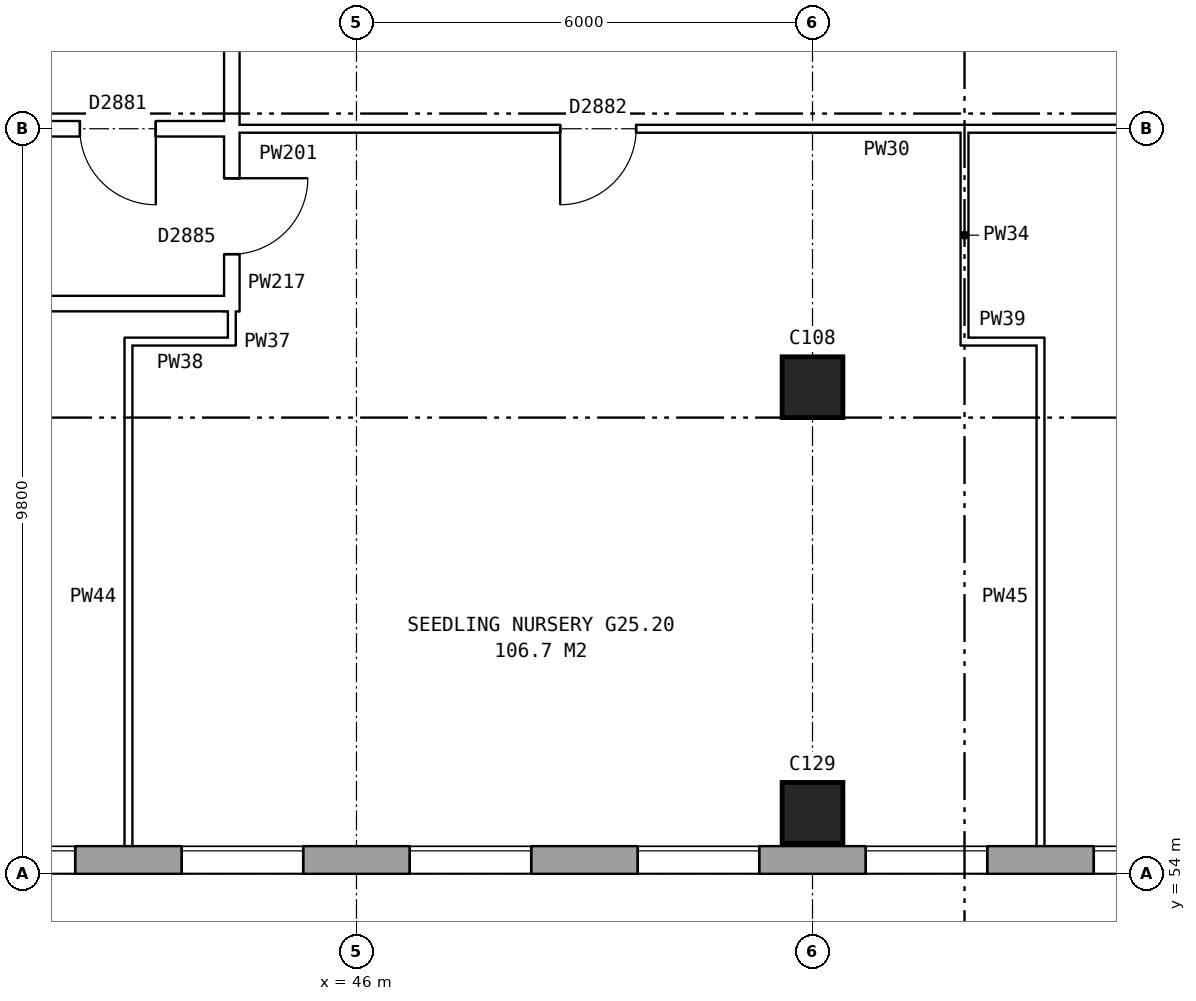
"""IFC4 building model, lengths in metres.
Left out: names, types, materials, properties, quantities, classifications, styles, units other than length and angle.
Written with IfcOpenShell. Run it as: python <this file> out.ifc"""

import sys

from ifc_helpers import new_model, si_unit, direction, frame, frame_2d, origin, origin_2d, place, context, subcontext, project, spatial, rectangle, extrude, element, fill, save


model = new_model("IFC4")
c1 = context("Model", 3, precision=1e-05, world=origin(), true_north=direction((0.0, 1.0)))
c2 = subcontext(c1, "Body", "Model", "MODEL_VIEW")
j1 = project(units=[si_unit("LENGTHUNIT", "METRE"), si_unit("PLANEANGLEUNIT", "RADIAN")], contexts=[c1])
p1 = place(None, origin())
s1 = spatial("IfcSite", under=j1, at=p1, CompositionType="ELEMENT")
p2 = place(p1, origin())
s2 = spatial("IfcBuilding", under=s1, at=p2, CompositionType="ELEMENT")
p3 = place(p2, frame((0.0, 0.0, 90.2)))
s3 = spatial("IfcBuildingStorey", under=s2, at=p3, CompositionType="ELEMENT", Elevation=90.2)
for number, where, z_axis, x_axis in (
    (1, (52.0, 54.8, 0.0), (0.0, 0.0, 1.0), (1.0, 0.0, 0.0)),
    (2, (52.0, 60.4, 0.0), (0.0, 0.0, 1.0), (1.0, 0.0, 0.0)),
):
    element("IfcColumn", number, at=place(p3, frame(where, z_axis=z_axis, x_axis=x_axis)), inside=s3, PredefinedType="COLUMN", context=c2, shape_type="SweptSolid", body=[
        extrude(rectangle(XDim=0.8, YDim=0.8, at=origin_2d()), origin(), (0.0, 0.0, 1.0), 5.6),
    ])
p4 = place(p3, frame((28.075, 54.18, 0.0), z_axis=(0.0, 0.0, 1.0), x_axis=(1.0, 0.0, 0.0)))
e3 = element("IfcWall", 3, at=p4, inside=s3, PredefinedType="STANDARD", context=c2, shape_type="SweptSolid", body=[
    extrude(rectangle(XDim=44.851, YDim=0.36, at=frame_2d((22.425, 0.0))), origin(), (0.0, 0.0, 1.0), 5.6),
])
p5 = place(p4, frame((0.625, 0.0, 0.15)))
e4 = element("IfcOpeningElement", 4, at=p5, cuts=e3, PredefinedType="OPENING", context=c2, shape_type="SweptSolid", body=[
    extrude(rectangle(XDim=1.6, YDim=2.4, at=frame_2d((0.8, 1.2))), frame((0.0, 0.19, 0.0), z_axis=(0.0, -1.0, 0.0), x_axis=(1.0, 0.0, 0.0)), (0.0, 0.0, 1.0), 0.38),
])
p6 = place(p4, frame((3.625, 0.0, 0.15)))
e5 = element("IfcOpeningElement", 5, at=p6, cuts=e3, PredefinedType="OPENING", context=c2, shape_type="SweptSolid", body=[
    extrude(rectangle(XDim=1.6, YDim=2.4, at=frame_2d((0.8, 1.2))), frame((0.0, 0.19, 0.0), z_axis=(0.0, -1.0, 0.0), x_axis=(1.0, 0.0, 0.0)), (0.0, 0.0, 1.0), 0.38),
])
p7 = place(p4, frame((6.625, 0.0, 0.15)))
e6 = element("IfcOpeningElement", 6, at=p7, cuts=e3, PredefinedType="OPENING", context=c2, shape_type="SweptSolid", body=[
    extrude(rectangle(XDim=1.6, YDim=2.4, at=frame_2d((0.8, 1.2))), frame((0.0, 0.19, 0.0), z_axis=(0.0, -1.0, 0.0), x_axis=(1.0, 0.0, 0.0)), (0.0, 0.0, 1.0), 0.38),
])
p8 = place(p4, frame((9.625, 0.0, 0.15)))
e7 = element("IfcOpeningElement", 7, at=p8, cuts=e3, PredefinedType="OPENING", context=c2, shape_type="SweptSolid", body=[
    extrude(rectangle(XDim=1.6, YDim=2.4, at=frame_2d((0.8, 1.2))), frame((0.0, 0.19, 0.0), z_axis=(0.0, -1.0, 0.0), x_axis=(1.0, 0.0, 0.0)), (0.0, 0.0, 1.0), 0.38),
])
p9 = place(p4, frame((12.625, 0.0, 0.15)))
e8 = element("IfcOpeningElement", 8, at=p9, cuts=e3, PredefinedType="OPENING", context=c2, shape_type="SweptSolid", body=[
    extrude(rectangle(XDim=1.6, YDim=2.4, at=frame_2d((0.8, 1.2))), frame((0.0, 0.19, 0.0), z_axis=(0.0, -1.0, 0.0), x_axis=(1.0, 0.0, 0.0)), (0.0, 0.0, 1.0), 0.38),
])
p10 = place(p4, frame((15.625, 0.0, 0.15)))
e9 = element("IfcOpeningElement", 9, at=p10, cuts=e3, PredefinedType="OPENING", context=c2, shape_type="SweptSolid", body=[
    extrude(rectangle(XDim=1.6, YDim=2.4, at=frame_2d((0.8, 1.2))), frame((0.0, 0.19, 0.0), z_axis=(0.0, -1.0, 0.0), x_axis=(1.0, 0.0, 0.0)), (0.0, 0.0, 1.0), 0.38),
])
p11 = place(p4, frame((18.625, 0.0, 0.15)))
e10 = element("IfcOpeningElement", 10, at=p11, cuts=e3, PredefinedType="OPENING", context=c2, shape_type="SweptSolid", body=[
    extrude(rectangle(XDim=1.6, YDim=2.4, at=frame_2d((0.8, 1.2))), frame((0.0, 0.19, 0.0), z_axis=(0.0, -1.0, 0.0), x_axis=(1.0, 0.0, 0.0)), (0.0, 0.0, 1.0), 0.38),
])
p12 = place(p4, frame((21.625, 0.0, 0.15)))
e11 = element("IfcOpeningElement", 11, at=p12, cuts=e3, PredefinedType="OPENING", context=c2, shape_type="SweptSolid", body=[
    extrude(rectangle(XDim=1.6, YDim=2.4, at=frame_2d((0.8, 1.2))), frame((0.0, 0.19, 0.0), z_axis=(0.0, -1.0, 0.0), x_axis=(1.0, 0.0, 0.0)), (0.0, 0.0, 1.0), 0.38),
])
p13 = place(p4, frame((24.625, 0.0, 0.15)))
e12 = element("IfcOpeningElement", 12, at=p13, cuts=e3, PredefinedType="OPENING", context=c2, shape_type="SweptSolid", body=[
    extrude(rectangle(XDim=1.6, YDim=2.4, at=frame_2d((0.8, 1.2))), frame((0.0, 0.19, 0.0), z_axis=(0.0, -1.0, 0.0), x_axis=(1.0, 0.0, 0.0)), (0.0, 0.0, 1.0), 0.38),
])
p14 = place(p4, frame((27.625, 0.0, 0.15)))
e13 = element("IfcOpeningElement", 13, at=p14, cuts=e3, PredefinedType="OPENING", context=c2, shape_type="SweptSolid", body=[
    extrude(rectangle(XDim=1.6, YDim=2.4, at=frame_2d((0.8, 1.2))), frame((0.0, 0.19, 0.0), z_axis=(0.0, -1.0, 0.0), x_axis=(1.0, 0.0, 0.0)), (0.0, 0.0, 1.0), 0.38),
])
p15 = place(p4, frame((30.625, 0.0, 0.15)))
e14 = element("IfcOpeningElement", 14, at=p15, cuts=e3, PredefinedType="OPENING", context=c2, shape_type="SweptSolid", body=[
    extrude(rectangle(XDim=1.6, YDim=2.4, at=frame_2d((0.8, 1.2))), frame((0.0, 0.19, 0.0), z_axis=(0.0, -1.0, 0.0), x_axis=(1.0, 0.0, 0.0)), (0.0, 0.0, 1.0), 0.38),
])
p16 = place(p4, frame((33.625, 0.0, 0.15)))
e15 = element("IfcOpeningElement", 15, at=p16, cuts=e3, PredefinedType="OPENING", context=c2, shape_type="SweptSolid", body=[
    extrude(rectangle(XDim=1.6, YDim=2.4, at=frame_2d((0.8, 1.2))), frame((0.0, 0.19, 0.0), z_axis=(0.0, -1.0, 0.0), x_axis=(1.0, 0.0, 0.0)), (0.0, 0.0, 1.0), 0.38),
])
p17 = place(p4, frame((36.625, 0.0, 0.15)))
e16 = element("IfcOpeningElement", 16, at=p17, cuts=e3, PredefinedType="OPENING", context=c2, shape_type="SweptSolid", body=[
    extrude(rectangle(XDim=1.6, YDim=2.4, at=frame_2d((0.8, 1.2))), frame((0.0, 0.19, 0.0), z_axis=(0.0, -1.0, 0.0), x_axis=(1.0, 0.0, 0.0)), (0.0, 0.0, 1.0), 0.38),
])
p18 = place(p4, frame((39.625, 0.0, 0.15)))
e17 = element("IfcOpeningElement", 17, at=p18, cuts=e3, PredefinedType="OPENING", context=c2, shape_type="SweptSolid", body=[
    extrude(rectangle(XDim=1.6, YDim=2.4, at=frame_2d((0.8, 1.2))), frame((0.0, 0.19, 0.0), z_axis=(0.0, -1.0, 0.0), x_axis=(1.0, 0.0, 0.0)), (0.0, 0.0, 1.0), 0.38),
])
p19 = place(p4, frame((42.625, 0.0, 0.15)))
e18 = element("IfcOpeningElement", 18, at=p19, cuts=e3, PredefinedType="OPENING", context=c2, shape_type="SweptSolid", body=[
    extrude(rectangle(XDim=1.6, YDim=2.4, at=frame_2d((0.8, 1.2))), frame((0.0, 0.19, 0.0), z_axis=(0.0, -1.0, 0.0), x_axis=(1.0, 0.0, 0.0)), (0.0, 0.0, 1.0), 0.38),
])
p20 = place(p3, frame((44.36, 63.9, 0.0), z_axis=(0.0, 0.0, 1.0), x_axis=(0.0, 1.0, 0.0)))
e19 = element("IfcWall", 19, at=p20, inside=s3, PredefinedType="PARTITIONING", context=c2, shape_type="SweptSolid", body=[
    extrude(rectangle(XDim=12.2, YDim=0.2, at=frame_2d((6.1, 0.0))), origin(), (0.0, 0.0, 1.0), 5.6),
])
p21 = place(p20, frame((5.1, 0.0, 0.0)))
e20 = element("IfcOpeningElement", 20, at=p21, cuts=e19, PredefinedType="OPENING", context=c2, shape_type="SweptSolid", body=[
    extrude(rectangle(XDim=2.0, YDim=2.1, at=frame_2d((1.0, 1.05))), frame((0.0, 0.11, 0.0), z_axis=(0.0, -1.0, 0.0), x_axis=(1.0, 0.0, 0.0)), (0.0, 0.0, 1.0), 0.22),
])
p22 = place(p3, frame((42.95, 61.0, 0.0), z_axis=(0.0, 0.0, 1.0), x_axis=(1.0, 0.0, 0.0)))
e21 = element("IfcWall", 21, at=p22, inside=s3, PredefinedType="PARTITIONING", context=c2, shape_type="SweptSolid", body=[
    extrude(rectangle(XDim=1.46, YDim=0.1, at=frame_2d((0.73, 0.0))), origin(), (0.0, 0.0, 1.0), 5.6),
])
p23 = place(p3, frame((53.95, 61.0, 0.0), z_axis=(0.0, 0.0, 1.0), x_axis=(1.0, 0.0, 0.0)))
e22 = element("IfcWall", 22, at=p23, inside=s3, PredefinedType="PARTITIONING", context=c2, shape_type="SweptSolid", body=[
    extrude(rectangle(XDim=1.1, YDim=0.1, at=frame_2d((0.55, 0.0))), origin(), (0.0, 0.0, 1.0), 5.6),
])
p24 = place(p3, frame((25.24, 61.5, 0.0), z_axis=(0.0, 0.0, 1.0), x_axis=(1.0, 0.0, 0.0)))
e23 = element("IfcWall", 23, at=p24, inside=s3, PredefinedType="PARTITIONING", context=c2, shape_type="SweptSolid", body=[
    extrude(rectangle(XDim=19.22, YDim=0.2, at=frame_2d((9.61, 0.0))), origin(), (0.0, 0.0, 1.0), 5.6),
])
p25 = place(p24, frame((0.94, 0.0, 0.0)))
e24 = element("IfcOpeningElement", 24, at=p25, cuts=e23, PredefinedType="OPENING", context=c2, shape_type="SweptSolid", body=[
    extrude(rectangle(XDim=1.0, YDim=2.1, at=frame_2d((0.5, 1.05))), frame((0.0, 0.11, 0.0), z_axis=(0.0, -1.0, 0.0), x_axis=(1.0, 0.0, 0.0)), (0.0, 0.0, 1.0), 0.22),
])
p26 = place(p24, frame((6.76, 0.0, 0.0)))
e25 = element("IfcOpeningElement", 25, at=p26, cuts=e23, PredefinedType="OPENING", context=c2, shape_type="SweptSolid", body=[
    extrude(rectangle(XDim=1.0, YDim=2.1, at=frame_2d((0.5, 1.05))), frame((0.0, 0.11, 0.0), z_axis=(0.0, -1.0, 0.0), x_axis=(1.0, 0.0, 0.0)), (0.0, 0.0, 1.0), 0.22),
])
p27 = place(p24, frame((15.24, 0.0, 0.0)))
e26 = element("IfcOpeningElement", 26, at=p27, cuts=e23, PredefinedType="OPENING", context=c2, shape_type="SweptSolid", body=[
    extrude(rectangle(XDim=1.0, YDim=2.1, at=frame_2d((0.5, 1.05))), frame((0.0, 0.11, 0.0), z_axis=(0.0, -1.0, 0.0), x_axis=(1.0, 0.0, 0.0)), (0.0, 0.0, 1.0), 0.22),
])
p28 = place(p3, frame((41.36, 63.8, 0.0), z_axis=(0.0, 0.0, 1.0), x_axis=(1.0, 0.0, 0.0)))
e27 = element("IfcWall", 27, at=p28, inside=s3, PredefinedType="PARTITIONING", context=c2, shape_type="SweptSolid", body=[
    extrude(rectangle(XDim=3.1, YDim=0.2, at=frame_2d((1.55, 0.0))), origin(), (0.0, 0.0, 1.0), 5.6),
])
p29 = place(p28, frame((1.0, 0.0, 0.0)))
e28 = element("IfcOpeningElement", 28, at=p29, cuts=e27, PredefinedType="OPENING", context=c2, shape_type="SweptSolid", body=[
    extrude(rectangle(XDim=1.0, YDim=2.1, at=frame_2d((0.5, 1.05))), frame((0.0, 0.11, 0.0), z_axis=(0.0, -1.0, 0.0), x_axis=(1.0, 0.0, 0.0)), (0.0, 0.0, 1.0), 0.22),
])
p30 = place(p3, frame((44.26, 63.8, 0.0), z_axis=(0.0, 0.0, 1.0), x_axis=(1.0, 0.0, 0.0)))
e29 = element("IfcWall", 29, at=p30, inside=s3, PredefinedType="PARTITIONING", context=c2, shape_type="SweptSolid", body=[
    extrude(rectangle(XDim=19.38, YDim=0.1, at=frame_2d((9.69, 0.0))), origin(), (0.0, 0.0, 1.0), 5.6),
])
p31 = place(p30, frame((4.42, 0.0, 0.0)))
e30 = element("IfcOpeningElement", 30, at=p31, cuts=e29, PredefinedType="OPENING", context=c2, shape_type="SweptSolid", body=[
    extrude(rectangle(XDim=1.0, YDim=2.1, at=frame_2d((0.5, 1.05))), frame((0.0, 0.06, 0.0), z_axis=(0.0, -1.0, 0.0), x_axis=(1.0, 0.0, 0.0)), (0.0, 0.0, 1.0), 0.12),
])
p32 = place(p30, frame((14.06, 0.0, 0.0)))
e31 = element("IfcOpeningElement", 31, at=p32, cuts=e29, PredefinedType="OPENING", context=c2, shape_type="SweptSolid", body=[
    extrude(rectangle(XDim=1.0, YDim=2.1, at=frame_2d((0.5, 1.05))), frame((0.0, 0.06, 0.0), z_axis=(0.0, -1.0, 0.0), x_axis=(1.0, 0.0, 0.0)), (0.0, 0.0, 1.0), 0.12),
])
p33 = place(p3, frame((43.0, 54.24, 0.0), z_axis=(0.0, 0.0, 1.0), x_axis=(0.0, 1.0, 0.0)))
e32 = element("IfcWall", 32, at=p33, inside=s3, PredefinedType="PARTITIONING", context=c2, shape_type="SweptSolid", body=[
    extrude(rectangle(XDim=6.81, YDim=0.1, at=frame_2d((3.405, 0.0))), origin(), (0.0, 0.0, 1.0), 5.6),
])
p34 = place(p3, frame((44.36, 61.398, 0.0), z_axis=(0.0, 0.0, 1.0), x_axis=(0.0, 1.0, 0.0)))
e33 = element("IfcWall", 33, at=p34, inside=s3, PredefinedType="PARTITIONING", context=c2, shape_type="SweptSolid", body=[
    extrude(rectangle(XDim=2.502, YDim=0.2, at=frame_2d((1.251, 0.0))), origin(), (0.0, 0.0, 1.0), 5.6),
])
p35 = place(p34, frame((0.751, 0.0, 0.0)))
e34 = element("IfcOpeningElement", 34, at=p35, cuts=e33, PredefinedType="OPENING", context=c2, shape_type="SweptSolid", body=[
    extrude(rectangle(XDim=1.0, YDim=2.1, at=frame_2d((0.5, 1.05))), frame((0.0, 0.11, 0.0), z_axis=(0.0, -1.0, 0.0), x_axis=(1.0, 0.0, 0.0)), (0.0, 0.0, 1.0), 0.22),
])
p36 = place(p3, frame((44.36, 60.95, 0.0), z_axis=(0.0, 0.0, 1.0), x_axis=(0.0, 1.0, 0.0)))
e35 = element("IfcWall", 35, at=p36, inside=s3, PredefinedType="PARTITIONING", context=c2, shape_type="SweptSolid", body=[
    extrude(rectangle(XDim=0.652, YDim=0.1, at=frame_2d((0.326, 0.0))), origin(), (0.0, 0.0, 1.0), 5.6),
])
p37 = place(p3, frame((54.0, 60.95, 0.0), z_axis=(0.0, 0.0, 1.0), x_axis=(0.0, 1.0, 0.0)))
e36 = element("IfcWall", 36, at=p37, inside=s3, PredefinedType="PARTITIONING", context=c2, shape_type="SweptSolid", body=[
    extrude(rectangle(XDim=2.9, YDim=0.1, at=frame_2d((1.45, 0.0))), origin(), (0.0, 0.0, 1.0), 5.6),
])
p38 = place(p3, frame((55.0, 54.24, 0.0), z_axis=(0.0, 0.0, 1.0), x_axis=(0.0, 1.0, 0.0)))
e37 = element("IfcWall", 37, at=p38, inside=s3, PredefinedType="PARTITIONING", context=c2, shape_type="SweptSolid", body=[
    extrude(rectangle(XDim=6.81, YDim=0.1, at=frame_2d((3.405, 0.0))), origin(), (0.0, 0.0, 1.0), 5.6),
])
p39 = place(p9, origin())
e38 = element("IfcWindow", 38, at=p39, inside=s3, PartitioningType="SINGLE_PANEL", PredefinedType="WINDOW", context=c2, shape_type="SweptSolid", body=[
    extrude(rectangle(XDim=1.6, YDim=2.4, at=frame_2d((0.8, 1.2))), frame((0.0, 0.15, 0.0), z_axis=(0.0, -1.0, 0.0), x_axis=(1.0, 0.0, 0.0)), (0.0, 0.0, 1.0), 0.06),
])
fill(e8, e38)
p40 = place(p10, origin())
e39 = element("IfcWindow", 39, at=p40, inside=s3, PartitioningType="SINGLE_PANEL", PredefinedType="WINDOW", context=c2, shape_type="SweptSolid", body=[
    extrude(rectangle(XDim=1.6, YDim=2.4, at=frame_2d((0.8, 1.2))), frame((0.0, 0.15, 0.0), z_axis=(0.0, -1.0, 0.0), x_axis=(1.0, 0.0, 0.0)), (0.0, 0.0, 1.0), 0.06),
])
fill(e9, e39)
p41 = place(p11, origin())
e40 = element("IfcWindow", 40, at=p41, inside=s3, PartitioningType="SINGLE_PANEL", PredefinedType="WINDOW", context=c2, shape_type="SweptSolid", body=[
    extrude(rectangle(XDim=1.6, YDim=2.4, at=frame_2d((0.8, 1.2))), frame((0.0, 0.15, 0.0), z_axis=(0.0, -1.0, 0.0), x_axis=(1.0, 0.0, 0.0)), (0.0, 0.0, 1.0), 0.06),
])
fill(e10, e40)
p42 = place(p12, origin())
e41 = element("IfcWindow", 41, at=p42, inside=s3, PartitioningType="SINGLE_PANEL", PredefinedType="WINDOW", context=c2, shape_type="SweptSolid", body=[
    extrude(rectangle(XDim=1.6, YDim=2.4, at=frame_2d((0.8, 1.2))), frame((0.0, 0.15, 0.0), z_axis=(0.0, -1.0, 0.0), x_axis=(1.0, 0.0, 0.0)), (0.0, 0.0, 1.0), 0.06),
])
fill(e11, e41)
p43 = place(p13, origin())
e42 = element("IfcWindow", 42, at=p43, inside=s3, PartitioningType="SINGLE_PANEL", PredefinedType="WINDOW", context=c2, shape_type="SweptSolid", body=[
    extrude(rectangle(XDim=1.6, YDim=2.4, at=frame_2d((0.8, 1.2))), frame((0.0, 0.15, 0.0), z_axis=(0.0, -1.0, 0.0), x_axis=(1.0, 0.0, 0.0)), (0.0, 0.0, 1.0), 0.06),
])
fill(e12, e42)
p44 = place(p14, origin())
e43 = element("IfcWindow", 43, at=p44, inside=s3, PartitioningType="SINGLE_PANEL", PredefinedType="WINDOW", context=c2, shape_type="SweptSolid", body=[
    extrude(rectangle(XDim=1.6, YDim=2.4, at=frame_2d((0.8, 1.2))), frame((0.0, 0.15, 0.0), z_axis=(0.0, -1.0, 0.0), x_axis=(1.0, 0.0, 0.0)), (0.0, 0.0, 1.0), 0.06),
])
fill(e13, e43)
p45 = place(p29, frame((1.0, 0.0, 0.0), z_axis=(0.0, 0.0, 1.0), x_axis=(-1.0, 0.0, 0.0)))
e44 = element("IfcDoor", 44, at=p45, inside=s3, OperationType="SINGLE_SWING_LEFT", PredefinedType="DOOR", context=c2, shape_type="SweptSolid", body=[
    extrude(rectangle(XDim=1.0, YDim=2.1, at=frame_2d((0.5, 1.05))), frame((0.0, 0.025, 0.0), z_axis=(0.0, -1.0, 0.0), x_axis=(1.0, 0.0, 0.0)), (0.0, 0.0, 1.0), 0.05),
])
fill(e28, e44)
p46 = place(p31, frame((1.0, 0.0, 0.0), z_axis=(0.0, 0.0, 1.0), x_axis=(-1.0, 0.0, 0.0)))
e45 = element("IfcDoor", 45, at=p46, inside=s3, OperationType="SINGLE_SWING_RIGHT", PredefinedType="DOOR", context=c2, shape_type="SweptSolid", body=[
    extrude(rectangle(XDim=1.0, YDim=2.1, at=frame_2d((0.5, 1.05))), frame((0.0, 0.025, 0.0), z_axis=(0.0, -1.0, 0.0), x_axis=(1.0, 0.0, 0.0)), (0.0, 0.0, 1.0), 0.05),
])
fill(e30, e45)
p47 = place(p35, frame((1.0, 0.0, 0.0), z_axis=(0.0, 0.0, 1.0), x_axis=(-1.0, 0.0, 0.0)))
e46 = element("IfcDoor", 46, at=p47, inside=s3, OperationType="SINGLE_SWING_LEFT", PredefinedType="DOOR", context=c2, shape_type="SweptSolid", body=[
    extrude(rectangle(XDim=1.0, YDim=2.1, at=frame_2d((0.5, 1.05))), frame((0.0, 0.025, 0.0), z_axis=(0.0, -1.0, 0.0), x_axis=(1.0, 0.0, 0.0)), (0.0, 0.0, 1.0), 0.05),
])
fill(e34, e46)
save(model, sys.argv[1])
